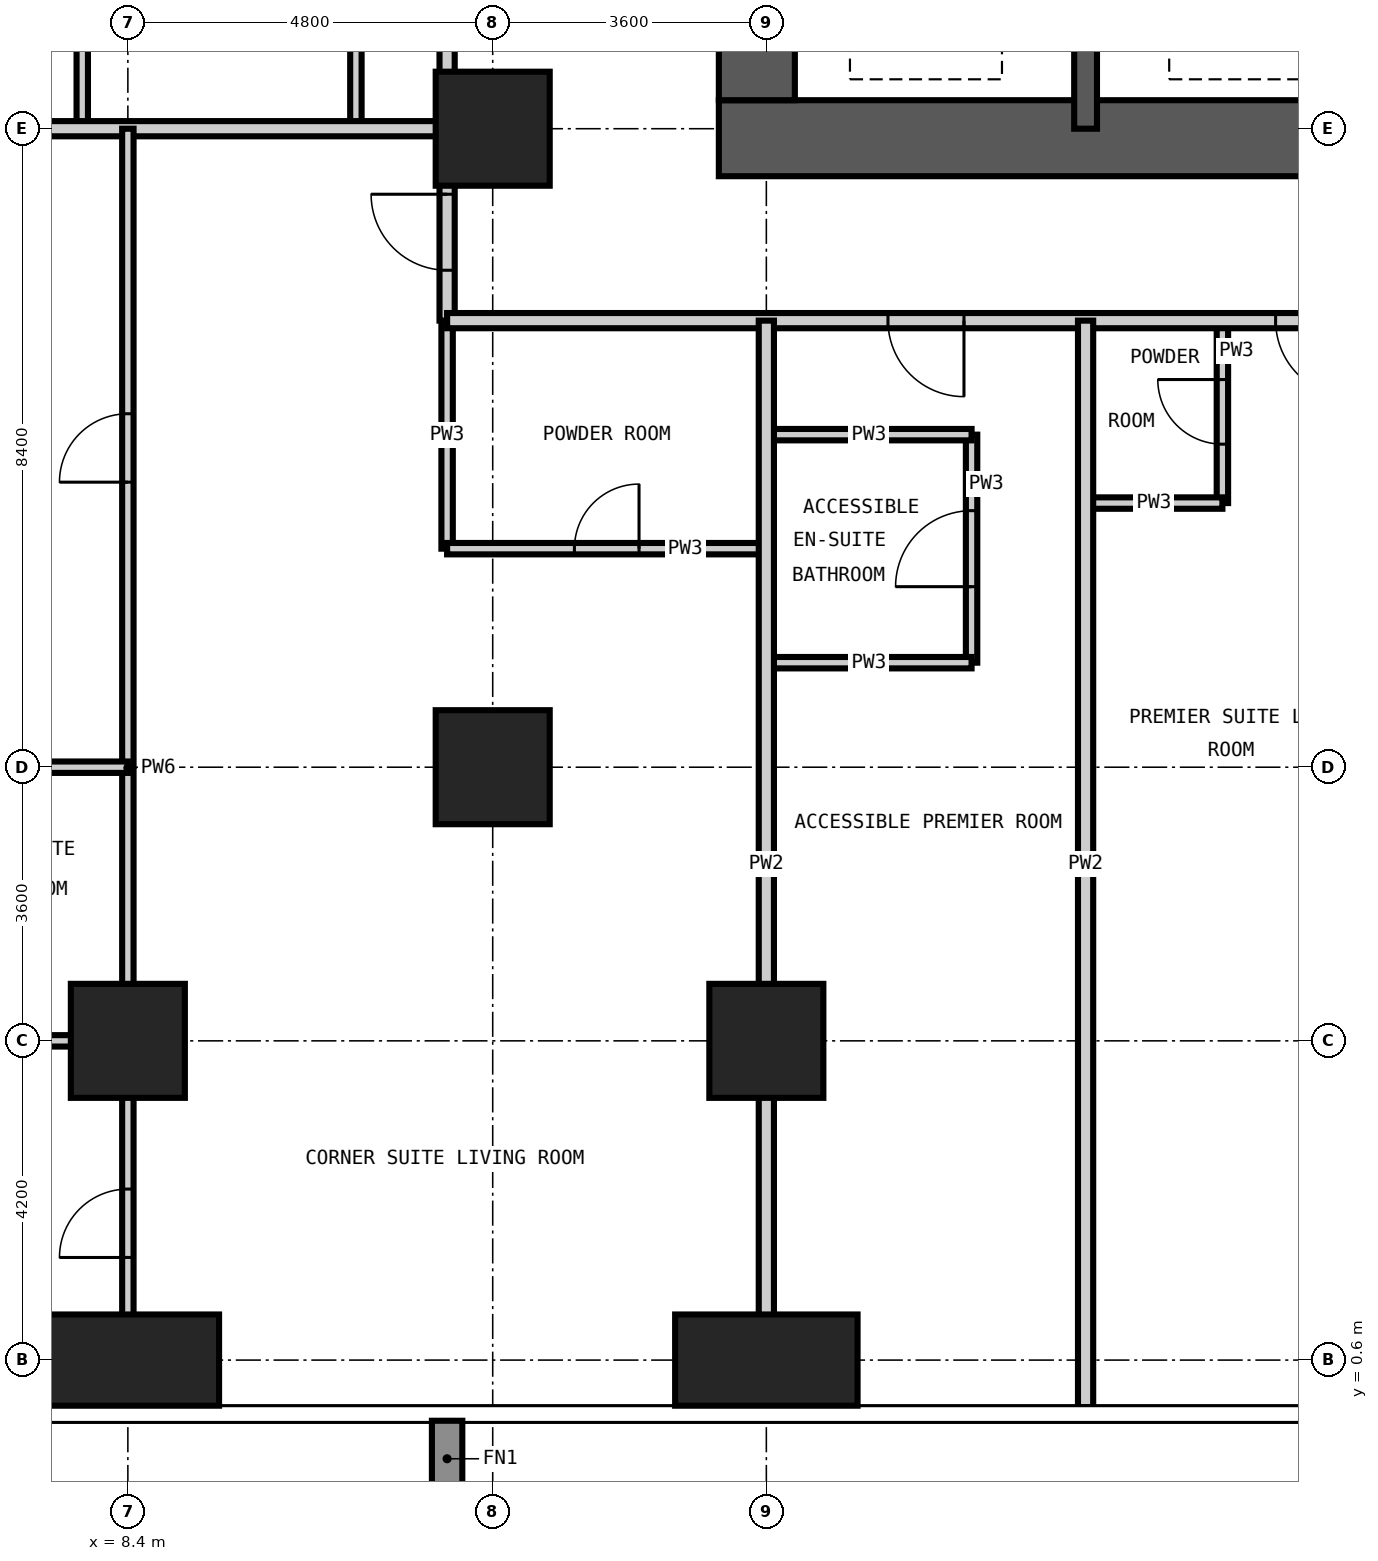
"""IFC4 building model, lengths in metres.
Left out: names, types, materials, properties, quantities, classifications, styles, units other than length and angle.
Written with IfcOpenShell. Run it as: python <this file> out.ifc"""

import sys

from ifc_helpers import new_model, si_unit, direction, frame, frame_2d, origin, origin_2d, place, context, subcontext, project, spatial, rectangle, extrude, element, fill, save


model = new_model("IFC4")
c1 = context("Model", 3, precision=1e-05, world=origin(), true_north=direction((0.0, 1.0)))
c2 = subcontext(c1, "Body", "Model", "MODEL_VIEW")
j1 = project(units=[si_unit("LENGTHUNIT", "METRE"), si_unit("PLANEANGLEUNIT", "RADIAN")], contexts=[c1])
p1 = place(None, origin())
s1 = spatial("IfcSite", under=j1, at=p1, CompositionType="ELEMENT")
p2 = place(p1, origin())
s2 = spatial("IfcBuilding", under=s1, at=p2, CompositionType="ELEMENT")
p3 = place(p2, frame((0.0, 0.0, 133.2)))
s3 = spatial("IfcBuildingStorey", under=s2, at=p3, CompositionType="ELEMENT", Elevation=133.2)
p4 = place(p3, frame((8.4, 0.6, -0.35), z_axis=(0.0, 0.0, 1.0), x_axis=(1.0, 0.0, 0.0)))
e1 = element("IfcColumn", 1, at=p4, inside=s3, PredefinedType="COLUMN", context=c2, shape_type="SweptSolid", body=[
    extrude(rectangle(XDim=2.4, YDim=1.2, at=origin_2d()), origin(), (0.0, 0.0, 1.0), 3.6),
])
for number, where, z_axis, x_axis in (
    (2, (8.4, 4.8, -0.35), (0.0, 0.0, 1.0), (1.0, 0.0, 0.0)),
    (3, (13.2, 8.4, -0.35), (0.0, 0.0, 1.0), (1.0, 0.0, 0.0)),
    (4, (13.2, 16.8, -0.35), (0.0, 0.0, 1.0), (1.0, 0.0, 0.0)),
):
    element("IfcColumn", number, at=place(p3, frame(where, z_axis=z_axis, x_axis=x_axis)), inside=s3, PredefinedType="COLUMN", context=c2, shape_type="SweptSolid", body=[
        extrude(rectangle(XDim=1.5, YDim=1.5, at=origin_2d()), origin(), (0.0, 0.0, 1.0), 3.6),
    ])
p5 = place(p3, frame((16.8, 0.6, -0.35), z_axis=(0.0, 0.0, 1.0), x_axis=(1.0, 0.0, 0.0)))
e5 = element("IfcColumn", 5, at=p5, inside=s3, PredefinedType="COLUMN", context=c2, shape_type="SweptSolid", body=[
    extrude(rectangle(XDim=2.4, YDim=1.2, at=origin_2d()), origin(), (0.0, 0.0, 1.0), 3.6),
])
p6 = place(p3, frame((16.8, 4.8, -0.35), z_axis=(0.0, 0.0, 1.0), x_axis=(1.0, 0.0, 0.0)))
e6 = element("IfcColumn", 6, at=p6, inside=s3, PredefinedType="COLUMN", context=c2, shape_type="SweptSolid", body=[
    extrude(rectangle(XDim=1.5, YDim=1.5, at=origin_2d()), origin(), (0.0, 0.0, 1.0), 3.6),
])
p7 = place(p3, frame((16.175, 16.675, -0.35), z_axis=(0.0, 0.0, 1.0), x_axis=(1.0, 0.0, 0.0)))
e7 = element("IfcWall", 7, at=p7, inside=s3, PredefinedType="SHEAR", context=c2, shape_type="SweptSolid", body=[
    extrude(rectangle(XDim=26.45, YDim=1.0, at=frame_2d((13.225, 0.0))), origin(), (0.0, 0.0, 1.0), 3.6),
])
p8 = place(p7, frame((12.725, 0.0, 0.35)))
e8 = element("IfcOpeningElement", 8, at=p8, cuts=e7, PredefinedType="OPENING", context=c2, shape_type="SweptSolid", body=[
    extrude(rectangle(XDim=1.0, YDim=2.1, at=frame_2d((0.5, 1.05))), frame((0.0, 0.51, 0.0), z_axis=(0.0, -1.0, 0.0), x_axis=(1.0, 0.0, 0.0)), (0.0, 0.0, 1.0), 1.02),
])
p9 = place(p7, frame((19.025, 0.0, 0.35)))
e9 = element("IfcOpeningElement", 9, at=p9, cuts=e7, PredefinedType="OPENING", context=c2, shape_type="SweptSolid", body=[
    extrude(rectangle(XDim=1.0, YDim=2.1, at=frame_2d((0.5, 1.05))), frame((0.0, 0.51, 0.0), z_axis=(0.0, -1.0, 0.0), x_axis=(1.0, 0.0, 0.0)), (0.0, 0.0, 1.0), 1.02),
])
p10 = place(p3, frame((16.675, 41.625, -0.35), z_axis=(0.0, 0.0, 1.0), x_axis=(0.0, -1.0, 0.0)))
e10 = element("IfcWall", 10, at=p10, inside=s3, PredefinedType="SHEAR", context=c2, shape_type="SweptSolid", body=[
    extrude(rectangle(XDim=24.45, YDim=1.0, at=frame_2d((12.225, 0.0))), origin(), (0.0, 0.0, 1.0), 3.6),
])
p11 = place(p10, frame((11.325, 0.0, 0.35)))
e11 = element("IfcOpeningElement", 11, at=p11, cuts=e10, PredefinedType="OPENING", context=c2, shape_type="SweptSolid", body=[
    extrude(rectangle(XDim=1.8, YDim=2.2, at=frame_2d((0.9, 1.1))), frame((0.0, 0.51, 0.0), z_axis=(0.0, -1.0, 0.0), x_axis=(1.0, 0.0, 0.0)), (0.0, 0.0, 1.0), 1.02),
])
p12 = place(p10, frame((20.125, 0.0, 0.35)))
e12 = element("IfcOpeningElement", 12, at=p12, cuts=e10, PredefinedType="OPENING", context=c2, shape_type="SweptSolid", body=[
    extrude(rectangle(XDim=1.0, YDim=2.1, at=frame_2d((0.5, 1.05))), frame((0.0, 0.51, 0.0), z_axis=(0.0, -1.0, 0.0), x_axis=(1.0, 0.0, 0.0)), (0.0, 0.0, 1.0), 1.02),
])
p13 = place(p10, frame((5.425, 0.0, 0.35)))
e13 = element("IfcOpeningElement", 13, at=p13, cuts=e10, PredefinedType="OPENING", context=c2, shape_type="SweptSolid", body=[
    extrude(rectangle(XDim=1.0, YDim=2.1, at=frame_2d((0.5, 1.05))), frame((0.0, 0.51, 0.0), z_axis=(0.0, -1.0, 0.0), x_axis=(1.0, 0.0, 0.0)), (0.0, 0.0, 1.0), 1.02),
])
p14 = place(p3, frame((21.0, 16.8, -0.35), z_axis=(0.0, 0.0, 1.0), x_axis=(0.0, 1.0, 0.0)))
e14 = element("IfcWall", 14, at=p14, inside=s3, PredefinedType="SHEAR", context=c2, shape_type="SweptSolid", body=[
    extrude(rectangle(XDim=2.8, YDim=0.3, at=frame_2d((1.4, 0.0))), origin(), (0.0, 0.0, 1.0), 3.6),
])
for number, where, z_axis, x_axis in (
    (15, (7.8, 16.8, 0.0), (0.0, 0.0, 1.0), (0.0, 1.0, 0.0)),
    (16, (11.4, 16.8, 0.0), (0.0, 0.0, 1.0), (0.0, 1.0, 0.0)),
):
    element("IfcWall", number, at=place(p3, frame(where, z_axis=z_axis, x_axis=x_axis)), inside=s3, PredefinedType="PARTITIONING", context=c2, shape_type="SweptSolid", body=[
        extrude(rectangle(XDim=2.7, YDim=0.15, at=frame_2d((1.35, 0.0))), origin(), (0.0, 0.0, 1.0), 3.25),
    ])
p15 = place(p3, frame((12.6, 11.275, 0.0), z_axis=(0.0, 0.0, 1.0), x_axis=(0.0, 1.0, 0.0)))
e17 = element("IfcWall", 17, at=p15, inside=s3, PredefinedType="PARTITIONING", context=c2, shape_type="SweptSolid", body=[
    extrude(rectangle(XDim=3.0, YDim=0.15, at=frame_2d((1.5, 0.0))), origin(), (0.0, 0.0, 1.0), 3.25),
])
p16 = place(p3, frame((19.5, 9.775, 0.0), z_axis=(0.0, 0.0, 1.0), x_axis=(0.0, 1.0, 0.0)))
e18 = element("IfcWall", 18, at=p16, inside=s3, PredefinedType="PARTITIONING", context=c2, shape_type="SweptSolid", body=[
    extrude(rectangle(XDim=3.0, YDim=0.15, at=frame_2d((1.5, 0.0))), origin(), (0.0, 0.0, 1.0), 3.25),
])
p17 = place(p16, frame((1.0, 0.0, 0.0)))
e19 = element("IfcOpeningElement", 19, at=p17, cuts=e18, PredefinedType="OPENING", context=c2, shape_type="SweptSolid", body=[
    extrude(rectangle(XDim=1.0, YDim=2.1, at=frame_2d((0.5, 1.05))), frame((0.0, 0.085, 0.0), z_axis=(0.0, -1.0, 0.0), x_axis=(1.0, 0.0, 0.0)), (0.0, 0.0, 1.0), 0.17),
])
p18 = place(p3, frame((22.8, 11.875, 0.0), z_axis=(0.0, 0.0, 1.0), x_axis=(0.0, 1.0, 0.0)))
e20 = element("IfcWall", 20, at=p18, inside=s3, PredefinedType="PARTITIONING", context=c2, shape_type="SweptSolid", body=[
    extrude(rectangle(XDim=2.4, YDim=0.15, at=frame_2d((1.2, 0.0))), origin(), (0.0, 0.0, 1.0), 3.25),
])
p19 = place(p18, frame((0.775, 0.0, 0.0)))
e21 = element("IfcOpeningElement", 21, at=p19, cuts=e20, PredefinedType="OPENING", context=c2, shape_type="SweptSolid", body=[
    extrude(rectangle(XDim=0.85, YDim=2.1, at=frame_2d((0.425, 1.05))), frame((0.0, 0.085, 0.0), z_axis=(0.0, -1.0, 0.0), x_axis=(1.0, 0.0, 0.0)), (0.0, 0.0, 1.0), 0.17),
])
p20 = place(p3, frame((5.4, 4.8, 0.0), z_axis=(0.0, 0.0, 1.0), x_axis=(1.0, 0.0, 0.0)))
e22 = element("IfcWall", 22, at=p20, inside=s3, PredefinedType="PARTITIONING", context=c2, shape_type="SweptSolid", body=[
    extrude(rectangle(XDim=3.0, YDim=0.15, at=frame_2d((1.5, 0.0))), origin(), (0.0, 0.0, 1.0), 3.25),
])
p21 = place(p3, frame((16.8, 9.775, 0.0), z_axis=(0.0, 0.0, 1.0), x_axis=(1.0, 0.0, 0.0)))
e23 = element("IfcWall", 23, at=p21, inside=s3, PredefinedType="PARTITIONING", context=c2, shape_type="SweptSolid", body=[
    extrude(rectangle(XDim=2.7, YDim=0.15, at=frame_2d((1.35, 0.0))), origin(), (0.0, 0.0, 1.0), 3.25),
])
p22 = place(p3, frame((12.6, 11.275, 0.0), z_axis=(0.0, 0.0, 1.0), x_axis=(1.0, 0.0, 0.0)))
e24 = element("IfcWall", 24, at=p22, inside=s3, PredefinedType="PARTITIONING", context=c2, shape_type="SweptSolid", body=[
    extrude(rectangle(XDim=4.2, YDim=0.15, at=frame_2d((2.1, 0.0))), origin(), (0.0, 0.0, 1.0), 3.25),
])
p23 = place(p22, frame((1.675, 0.0, 0.0)))
e25 = element("IfcOpeningElement", 25, at=p23, cuts=e24, PredefinedType="OPENING", context=c2, shape_type="SweptSolid", body=[
    extrude(rectangle(XDim=0.85, YDim=2.1, at=frame_2d((0.425, 1.05))), frame((0.0, 0.085, 0.0), z_axis=(0.0, -1.0, 0.0), x_axis=(1.0, 0.0, 0.0)), (0.0, 0.0, 1.0), 0.17),
])
p24 = place(p3, frame((21.0, 11.875, 0.0), z_axis=(0.0, 0.0, 1.0), x_axis=(1.0, 0.0, 0.0)))
e26 = element("IfcWall", 26, at=p24, inside=s3, PredefinedType="PARTITIONING", context=c2, shape_type="SweptSolid", body=[
    extrude(rectangle(XDim=1.8, YDim=0.15, at=frame_2d((0.9, 0.0))), origin(), (0.0, 0.0, 1.0), 3.25),
])
p25 = place(p3, frame((16.8, 12.775, 0.0), z_axis=(0.0, 0.0, 1.0), x_axis=(1.0, 0.0, 0.0)))
e27 = element("IfcWall", 27, at=p25, inside=s3, PredefinedType="PARTITIONING", context=c2, shape_type="SweptSolid", body=[
    extrude(rectangle(XDim=2.7, YDim=0.15, at=frame_2d((1.35, 0.0))), origin(), (0.0, 0.0, 1.0), 3.25),
])
p26 = place(p3, frame((12.6, 14.275, 0.0), z_axis=(0.0, 0.0, 1.0), x_axis=(0.0, 1.0, 0.0)))
e28 = element("IfcWall", 28, at=p26, inside=s3, PredefinedType="PARTITIONING", context=c2, shape_type="SweptSolid", body=[
    extrude(rectangle(XDim=30.85, YDim=0.2, at=frame_2d((15.425, 0.0))), origin(), (0.0, 0.0, 1.0), 3.25),
])
p27 = place(p26, frame((6.225, 0.0, 0.0)))
e29 = element("IfcOpeningElement", 29, at=p27, cuts=e28, PredefinedType="OPENING", context=c2, shape_type="SweptSolid", body=[
    extrude(rectangle(XDim=1.0, YDim=2.2, at=frame_2d((0.5, 1.1))), frame((0.0, 0.11, 0.0), z_axis=(0.0, -1.0, 0.0), x_axis=(1.0, 0.0, 0.0)), (0.0, 0.0, 1.0), 0.22),
])
p28 = place(p26, frame((12.525, 0.0, 0.0)))
e30 = element("IfcOpeningElement", 30, at=p28, cuts=e28, PredefinedType="OPENING", context=c2, shape_type="SweptSolid", body=[
    extrude(rectangle(XDim=1.0, YDim=2.2, at=frame_2d((0.5, 1.1))), frame((0.0, 0.11, 0.0), z_axis=(0.0, -1.0, 0.0), x_axis=(1.0, 0.0, 0.0)), (0.0, 0.0, 1.0), 0.22),
])
p29 = place(p26, frame((20.925, 0.0, 0.0)))
e31 = element("IfcOpeningElement", 31, at=p29, cuts=e28, PredefinedType="OPENING", context=c2, shape_type="SweptSolid", body=[
    extrude(rectangle(XDim=1.0, YDim=2.2, at=frame_2d((0.5, 1.1))), frame((0.0, 0.11, 0.0), z_axis=(0.0, -1.0, 0.0), x_axis=(1.0, 0.0, 0.0)), (0.0, 0.0, 1.0), 0.22),
])
p30 = place(p26, frame((0.663, 0.0, 0.0)))
e32 = element("IfcOpeningElement", 32, at=p30, cuts=e28, PredefinedType="OPENING", context=c2, shape_type="SweptSolid", body=[
    extrude(rectangle(XDim=1.0, YDim=2.2, at=frame_2d((0.5, 1.1))), frame((0.0, 0.11, 0.0), z_axis=(0.0, -1.0, 0.0), x_axis=(1.0, 0.0, 0.0)), (0.0, 0.0, 1.0), 0.22),
])
p31 = place(p26, frame((28.787, 0.0, 0.0)))
e33 = element("IfcOpeningElement", 33, at=p31, cuts=e28, PredefinedType="OPENING", context=c2, shape_type="SweptSolid", body=[
    extrude(rectangle(XDim=1.0, YDim=2.2, at=frame_2d((0.5, 1.1))), frame((0.0, 0.11, 0.0), z_axis=(0.0, -1.0, 0.0), x_axis=(1.0, 0.0, 0.0)), (0.0, 0.0, 1.0), 0.22),
])
p32 = place(p3, frame((45.725, 14.275, 0.0), z_axis=(0.0, 0.0, 1.0), x_axis=(-1.0, 0.0, 0.0)))
e34 = element("IfcWall", 34, at=p32, inside=s3, PredefinedType="PARTITIONING", context=c2, shape_type="SweptSolid", body=[
    extrude(rectangle(XDim=33.125, YDim=0.2, at=frame_2d((16.562, 0.0))), origin(), (0.0, 0.0, 1.0), 3.25),
])
p33 = place(p32, frame((26.325, 0.0, 0.0)))
e35 = element("IfcOpeningElement", 35, at=p33, cuts=e34, PredefinedType="OPENING", context=c2, shape_type="SweptSolid", body=[
    extrude(rectangle(XDim=1.0, YDim=2.2, at=frame_2d((0.5, 1.1))), frame((0.0, 0.11, 0.0), z_axis=(0.0, -1.0, 0.0), x_axis=(1.0, 0.0, 0.0)), (0.0, 0.0, 1.0), 0.22),
])
p34 = place(p32, frame((21.225, 0.0, 0.0)))
e36 = element("IfcOpeningElement", 36, at=p34, cuts=e34, PredefinedType="OPENING", context=c2, shape_type="SweptSolid", body=[
    extrude(rectangle(XDim=1.0, YDim=2.2, at=frame_2d((0.5, 1.1))), frame((0.0, 0.11, 0.0), z_axis=(0.0, -1.0, 0.0), x_axis=(1.0, 0.0, 0.0)), (0.0, 0.0, 1.0), 0.22),
])
p35 = place(p32, frame((12.825, 0.0, 0.0)))
e37 = element("IfcOpeningElement", 37, at=p35, cuts=e34, PredefinedType="OPENING", context=c2, shape_type="SweptSolid", body=[
    extrude(rectangle(XDim=1.0, YDim=2.2, at=frame_2d((0.5, 1.1))), frame((0.0, 0.11, 0.0), z_axis=(0.0, -1.0, 0.0), x_axis=(1.0, 0.0, 0.0)), (0.0, 0.0, 1.0), 0.22),
])
p36 = place(p32, frame((5.325, 0.0, 0.0)))
e38 = element("IfcOpeningElement", 38, at=p36, cuts=e34, PredefinedType="OPENING", context=c2, shape_type="SweptSolid", body=[
    extrude(rectangle(XDim=1.0, YDim=2.2, at=frame_2d((0.5, 1.1))), frame((0.0, 0.11, 0.0), z_axis=(0.0, -1.0, 0.0), x_axis=(1.0, 0.0, 0.0)), (0.0, 0.0, 1.0), 0.22),
])
for number, where, z_axis, x_axis in (
    (39, (16.8, -0.018, 0.0), (0.0, 0.0, 1.0), (0.0, 1.0, 0.0)),
    (40, (21.0, -0.018, 0.0), (0.0, 0.0, 1.0), (0.0, 1.0, 0.0)),
):
    element("IfcWall", number, at=place(p3, frame(where, z_axis=z_axis, x_axis=x_axis)), inside=s3, PredefinedType="PARTITIONING", context=c2, shape_type="SweptSolid", body=[
        extrude(rectangle(XDim=14.293, YDim=0.2, at=frame_2d((7.146, 0.0))), origin(), (0.0, 0.0, 1.0), 3.25),
    ])
p37 = place(p3, frame((-0.018, 16.8, 0.0), z_axis=(0.0, 0.0, 1.0), x_axis=(1.0, 0.0, 0.0)))
e41 = element("IfcWall", 41, at=p37, inside=s3, PredefinedType="PARTITIONING", context=c2, shape_type="SweptSolid", body=[
    extrude(rectangle(XDim=12.618, YDim=0.2, at=frame_2d((6.309, 0.0))), origin(), (0.0, 0.0, 1.0), 3.25),
])
p38 = place(p3, frame((8.4, -0.018, 0.0), z_axis=(0.0, 0.0, 1.0), x_axis=(0.0, 1.0, 0.0)))
e42 = element("IfcWall", 42, at=p38, inside=s3, PredefinedType="PARTITIONING", context=c2, shape_type="SweptSolid", body=[
    extrude(rectangle(XDim=16.818, YDim=0.15, at=frame_2d((8.409, 0.0))), origin(), (0.0, 0.0, 1.0), 3.25),
])
p39 = place(p38, frame((1.968, 0.0, 0.0)))
e43 = element("IfcOpeningElement", 43, at=p39, cuts=e42, PredefinedType="OPENING", context=c2, shape_type="SweptSolid", body=[
    extrude(rectangle(XDim=0.9, YDim=2.1, at=frame_2d((0.45, 1.05))), frame((0.0, 0.085, 0.0), z_axis=(0.0, -1.0, 0.0), x_axis=(1.0, 0.0, 0.0)), (0.0, 0.0, 1.0), 0.17),
])
p40 = place(p38, frame((12.168, 0.0, 0.0)))
e44 = element("IfcOpeningElement", 44, at=p40, cuts=e42, PredefinedType="OPENING", context=c2, shape_type="SweptSolid", body=[
    extrude(rectangle(XDim=0.9, YDim=2.1, at=frame_2d((0.45, 1.05))), frame((0.0, 0.085, 0.0), z_axis=(0.0, -1.0, 0.0), x_axis=(1.0, 0.0, 0.0)), (0.0, 0.0, 1.0), 0.17),
])
p41 = place(p3, frame((-0.018, 8.4, 0.0), z_axis=(0.0, 0.0, 1.0), x_axis=(1.0, 0.0, 0.0)))
e45 = element("IfcWall", 45, at=p41, inside=s3, PredefinedType="PARTITIONING", context=c2, shape_type="SweptSolid", body=[
    extrude(rectangle(XDim=8.418, YDim=0.15, at=frame_2d((4.209, 0.0))), origin(), (0.0, 0.0, 1.0), 3.25),
])
p42 = place(p41, frame((3.068, 0.0, 0.0)))
e46 = element("IfcOpeningElement", 46, at=p42, cuts=e45, PredefinedType="OPENING", context=c2, shape_type="SweptSolid", body=[
    extrude(rectangle(XDim=0.9, YDim=2.1, at=frame_2d((0.45, 1.05))), frame((0.0, 0.085, 0.0), z_axis=(0.0, -1.0, 0.0), x_axis=(1.0, 0.0, 0.0)), (0.0, 0.0, 1.0), 0.17),
])
p43 = place(p33, origin())
e47 = element("IfcDoor", 47, at=p43, inside=s3, OperationType="SINGLE_SWING_LEFT", PredefinedType="DOOR", context=c2, shape_type="SweptSolid", body=[
    extrude(rectangle(XDim=1.0, YDim=2.2, at=frame_2d((0.5, 1.1))), frame((0.0, 0.025, 0.0), z_axis=(0.0, -1.0, 0.0), x_axis=(1.0, 0.0, 0.0)), (0.0, 0.0, 1.0), 0.05),
])
fill(e35, e47)
p44 = place(p17, origin())
e48 = element("IfcDoor", 48, at=p44, inside=s3, OperationType="SINGLE_SWING_LEFT", PredefinedType="DOOR", context=c2, shape_type="SweptSolid", body=[
    extrude(rectangle(XDim=1.0, YDim=2.1, at=frame_2d((0.5, 1.05))), frame((0.0, 0.025, 0.0), z_axis=(0.0, -1.0, 0.0), x_axis=(1.0, 0.0, 0.0)), (0.0, 0.0, 1.0), 0.05),
])
fill(e19, e48)
p45 = place(p34, origin())
e49 = element("IfcDoor", 49, at=p45, inside=s3, OperationType="SINGLE_SWING_LEFT", PredefinedType="DOOR", context=c2, shape_type="SweptSolid", body=[
    extrude(rectangle(XDim=1.0, YDim=2.2, at=frame_2d((0.5, 1.1))), frame((0.0, 0.025, 0.0), z_axis=(0.0, -1.0, 0.0), x_axis=(1.0, 0.0, 0.0)), (0.0, 0.0, 1.0), 0.05),
])
fill(e36, e49)
p46 = place(p19, origin())
e50 = element("IfcDoor", 50, at=p46, inside=s3, OperationType="SINGLE_SWING_RIGHT", PredefinedType="DOOR", context=c2, shape_type="SweptSolid", body=[
    extrude(rectangle(XDim=0.85, YDim=2.1, at=frame_2d((0.425, 1.05))), frame((0.0, 0.025, 0.0), z_axis=(0.0, -1.0, 0.0), x_axis=(1.0, 0.0, 0.0)), (0.0, 0.0, 1.0), 0.05),
])
fill(e21, e50)
p47 = place(p30, origin())
e51 = element("IfcDoor", 51, at=p47, inside=s3, OperationType="SINGLE_SWING_RIGHT", PredefinedType="DOOR", context=c2, shape_type="SweptSolid", body=[
    extrude(rectangle(XDim=1.0, YDim=2.2, at=frame_2d((0.5, 1.1))), frame((0.0, 0.025, 0.0), z_axis=(0.0, -1.0, 0.0), x_axis=(1.0, 0.0, 0.0)), (0.0, 0.0, 1.0), 0.05),
])
fill(e32, e51)
p48 = place(p23, origin())
e52 = element("IfcDoor", 52, at=p48, inside=s3, OperationType="SINGLE_SWING_RIGHT", PredefinedType="DOOR", context=c2, shape_type="SweptSolid", body=[
    extrude(rectangle(XDim=0.85, YDim=2.1, at=frame_2d((0.425, 1.05))), frame((0.0, 0.025, 0.0), z_axis=(0.0, -1.0, 0.0), x_axis=(1.0, 0.0, 0.0)), (0.0, 0.0, 1.0), 0.05),
])
fill(e25, e52)
p49 = place(p39, origin())
e53 = element("IfcDoor", 53, at=p49, inside=s3, OperationType="SINGLE_SWING_LEFT", PredefinedType="DOOR", context=c2, shape_type="SweptSolid", body=[
    extrude(rectangle(XDim=0.9, YDim=2.1, at=frame_2d((0.45, 1.05))), frame((0.0, 0.025, 0.0), z_axis=(0.0, -1.0, 0.0), x_axis=(1.0, 0.0, 0.0)), (0.0, 0.0, 1.0), 0.05),
])
fill(e43, e53)
p50 = place(p40, origin())
e54 = element("IfcDoor", 54, at=p50, inside=s3, OperationType="SINGLE_SWING_LEFT", PredefinedType="DOOR", context=c2, shape_type="SweptSolid", body=[
    extrude(rectangle(XDim=0.9, YDim=2.1, at=frame_2d((0.45, 1.05))), frame((0.0, 0.025, 0.0), z_axis=(0.0, -1.0, 0.0), x_axis=(1.0, 0.0, 0.0)), (0.0, 0.0, 1.0), 0.05),
])
fill(e44, e54)
save(model, sys.argv[1])
